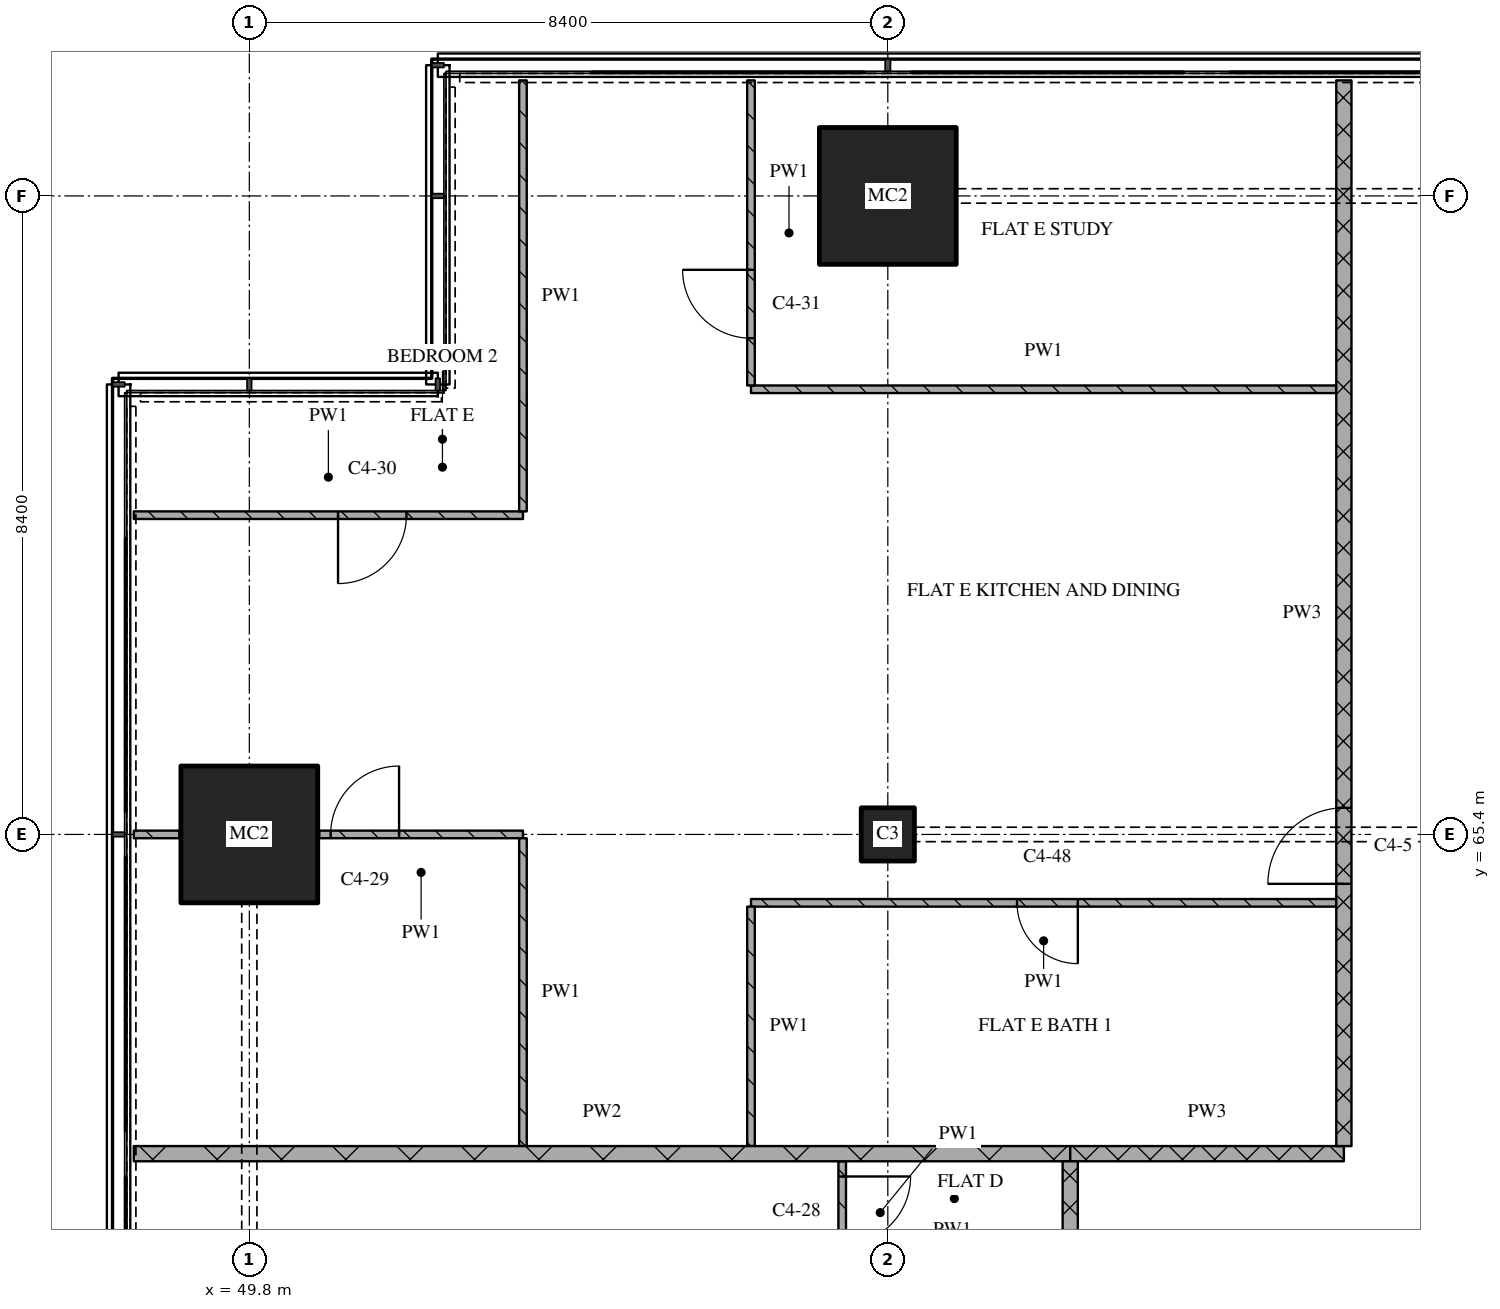
"""IFC4 building model, lengths in metres.
Left out: names, types, materials, properties, quantities, classifications, styles, units other than length and angle.
Written with IfcOpenShell. Run it as: python <this file> out.ifc"""

import sys

from ifc_helpers import new_model, si_unit, direction, frame, frame_2d, origin, origin_2d, place, context, subcontext, project, spatial, rectangle, extrude, element, fill, save


model = new_model("IFC4")
c1 = context("Model", 3, precision=1e-05, world=origin(), true_north=direction((0.0, 1.0)))
c2 = subcontext(c1, "Body", "Model", "MODEL_VIEW")
j1 = project(units=[si_unit("LENGTHUNIT", "METRE"), si_unit("PLANEANGLEUNIT", "RADIAN")], contexts=[c1])
p1 = place(None, origin())
s1 = spatial("IfcSite", under=j1, at=p1, CompositionType="ELEMENT")
p2 = place(p1, origin())
s2 = spatial("IfcBuilding", under=s1, at=p2, CompositionType="ELEMENT")
p3 = place(p2, frame((0.0, 0.0, 183.45)))
s3 = spatial("IfcBuildingStorey", under=s2, at=p3, CompositionType="ELEMENT", Elevation=183.45)
p4 = place(p3, frame((49.8, 65.4, 0.0), z_axis=(0.0, 0.0, 1.0), x_axis=(1.0, 0.0, 0.0)))
e1 = element("IfcColumn", 1, at=p4, inside=s3, PredefinedType="COLUMN", context=c2, shape_type="SweptSolid", body=[
    extrude(rectangle(XDim=1.8, YDim=1.8, at=origin_2d()), origin(), (0.0, 0.0, 1.0), 3.6),
])
p5 = place(p3, frame((58.2, 65.4, 0.0), z_axis=(0.0, 0.0, 1.0), x_axis=(1.0, 0.0, 0.0)))
e2 = element("IfcColumn", 2, at=p5, inside=s3, PredefinedType="COLUMN", context=c2, shape_type="SweptSolid", body=[
    extrude(rectangle(XDim=0.7, YDim=0.7, at=origin_2d()), origin(), (0.0, 0.0, 1.0), 3.6),
])
p6 = place(p3, frame((58.2, 73.8, 0.0), z_axis=(0.0, 0.0, 1.0), x_axis=(1.0, 0.0, 0.0)))
e3 = element("IfcColumn", 3, at=p6, inside=s3, PredefinedType="COLUMN", context=c2, shape_type="SweptSolid", body=[
    extrude(rectangle(XDim=1.8, YDim=1.8, at=origin_2d()), origin(), (0.0, 0.0, 1.0), 3.6),
])
p7 = place(p3, frame((60.6, 61.2, 0.0), z_axis=(0.0, 0.0, 1.0), x_axis=(1.0, 0.0, 0.0)))
e4 = element("IfcWall", 4, at=p7, inside=s3, PredefinedType="PARTITIONING", context=c2, shape_type="SweptSolid", body=[
    extrude(rectangle(XDim=3.6, YDim=0.2, at=frame_2d((1.8, 0.0))), origin(), (0.0, 0.0, 1.0), 3.32),
])
p8 = place(p3, frame((48.28, 61.2, 0.0), z_axis=(0.0, 0.0, 1.0), x_axis=(1.0, 0.0, 0.0)))
e5 = element("IfcWall", 5, at=p8, inside=s3, PredefinedType="PARTITIONING", context=c2, shape_type="SweptSolid", body=[
    extrude(rectangle(XDim=12.32, YDim=0.2, at=frame_2d((6.16, 0.0))), origin(), (0.0, 0.0, 1.0), 3.32),
])
p9 = place(p3, frame((64.1, 64.5, 0.0), z_axis=(0.0, 0.0, 1.0), x_axis=(-1.0, 0.0, 0.0)))
e6 = element("IfcWall", 6, at=p9, inside=s3, PredefinedType="PARTITIONING", context=c2, shape_type="SweptSolid", body=[
    extrude(rectangle(XDim=7.7, YDim=0.1, at=frame_2d((3.85, 0.0))), origin(), (0.0, 0.0, 1.0), 3.32),
])
p10 = place(p9, frame((3.4, 0.0, 0.0)))
e7 = element("IfcOpeningElement", 7, at=p10, cuts=e6, PredefinedType="OPENING", context=c2, shape_type="SweptSolid", body=[
    extrude(rectangle(XDim=0.8, YDim=2.1, at=frame_2d((0.4, 1.05))), frame((0.0, 0.06, 0.0), z_axis=(0.0, -1.0, 0.0), x_axis=(1.0, 0.0, 0.0)), (0.0, 0.0, 1.0), 0.12),
])
p11 = place(p3, frame((48.28, 65.4, 0.0), z_axis=(0.0, 0.0, 1.0), x_axis=(1.0, 0.0, 0.0)))
e8 = element("IfcWall", 8, at=p11, inside=s3, PredefinedType="PARTITIONING", context=c2, shape_type="SweptSolid", body=[
    extrude(rectangle(XDim=0.6, YDim=0.1, at=frame_2d((0.3, 0.0))), origin(), (0.0, 0.0, 1.0), 3.32),
])
p12 = place(p3, frame((53.4, 65.4, 0.0), z_axis=(0.0, 0.0, 1.0), x_axis=(-1.0, 0.0, 0.0)))
e9 = element("IfcWall", 9, at=p12, inside=s3, PredefinedType="PARTITIONING", context=c2, shape_type="SweptSolid", body=[
    extrude(rectangle(XDim=2.68, YDim=0.1, at=frame_2d((1.34, 0.0))), origin(), (0.0, 0.0, 1.0), 3.32),
])
p13 = place(p12, frame((1.63, 0.0, 0.0)))
e10 = element("IfcOpeningElement", 10, at=p13, cuts=e9, PredefinedType="OPENING", context=c2, shape_type="SweptSolid", body=[
    extrude(rectangle(XDim=0.9, YDim=2.1, at=frame_2d((0.45, 1.05))), frame((0.0, 0.06, 0.0), z_axis=(0.0, -1.0, 0.0), x_axis=(1.0, 0.0, 0.0)), (0.0, 0.0, 1.0), 0.12),
])
p14 = place(p3, frame((48.28, 69.6, 0.0), z_axis=(0.0, 0.0, 1.0), x_axis=(1.0, 0.0, 0.0)))
e11 = element("IfcWall", 11, at=p14, inside=s3, PredefinedType="PARTITIONING", context=c2, shape_type="SweptSolid", body=[
    extrude(rectangle(XDim=5.12, YDim=0.1, at=frame_2d((2.56, 0.0))), origin(), (0.0, 0.0, 1.0), 3.32),
])
p15 = place(p14, frame((2.687, 0.0, 0.0)))
e12 = element("IfcOpeningElement", 12, at=p15, cuts=e11, PredefinedType="OPENING", context=c2, shape_type="SweptSolid", body=[
    extrude(rectangle(XDim=0.9, YDim=2.1, at=frame_2d((0.45, 1.05))), frame((0.0, 0.06, 0.0), z_axis=(0.0, -1.0, 0.0), x_axis=(1.0, 0.0, 0.0)), (0.0, 0.0, 1.0), 0.12),
])
p16 = place(p3, frame((56.4, 71.256, 0.0), z_axis=(0.0, 0.0, 1.0), x_axis=(1.0, 0.0, 0.0)))
e13 = element("IfcWall", 13, at=p16, inside=s3, PredefinedType="PARTITIONING", context=c2, shape_type="SweptSolid", body=[
    extrude(rectangle(XDim=7.7, YDim=0.1, at=frame_2d((3.85, 0.0))), origin(), (0.0, 0.0, 1.0), 3.32),
])
p17 = place(p3, frame((53.4, 65.35, 0.0), z_axis=(0.0, 0.0, 1.0), x_axis=(0.0, -1.0, 0.0)))
e14 = element("IfcWall", 14, at=p17, inside=s3, PredefinedType="PARTITIONING", context=c2, shape_type="SweptSolid", body=[
    extrude(rectangle(XDim=4.05, YDim=0.1, at=frame_2d((2.025, 0.0))), origin(), (0.0, 0.0, 1.0), 3.32),
])
p18 = place(p3, frame((53.4, 75.32, 0.0), z_axis=(0.0, 0.0, 1.0), x_axis=(0.0, -1.0, 0.0)))
e15 = element("IfcWall", 15, at=p18, inside=s3, PredefinedType="PARTITIONING", context=c2, shape_type="SweptSolid", body=[
    extrude(rectangle(XDim=5.67, YDim=0.1, at=frame_2d((2.835, 0.0))), origin(), (0.0, 0.0, 1.0), 3.32),
])
p19 = place(p3, frame((56.4, 64.45, 0.0), z_axis=(0.0, 0.0, 1.0), x_axis=(0.0, -1.0, 0.0)))
e16 = element("IfcWall", 16, at=p19, inside=s3, PredefinedType="PARTITIONING", context=c2, shape_type="SweptSolid", body=[
    extrude(rectangle(XDim=3.15, YDim=0.1, at=frame_2d((1.575, 0.0))), origin(), (0.0, 0.0, 1.0), 3.32),
])
p20 = place(p3, frame((56.4, 75.32, 0.0), z_axis=(0.0, 0.0, 1.0), x_axis=(0.0, -1.0, 0.0)))
e17 = element("IfcWall", 17, at=p20, inside=s3, PredefinedType="PARTITIONING", context=c2, shape_type="SweptSolid", body=[
    extrude(rectangle(XDim=4.014, YDim=0.1, at=frame_2d((2.007, 0.0))), origin(), (0.0, 0.0, 1.0), 3.32),
])
p21 = place(p20, frame((2.492, 0.0, 0.0)))
e18 = element("IfcOpeningElement", 18, at=p21, cuts=e17, PredefinedType="OPENING", context=c2, shape_type="SweptSolid", body=[
    extrude(rectangle(XDim=0.9, YDim=2.1, at=frame_2d((0.45, 1.05))), frame((0.0, 0.06, 0.0), z_axis=(0.0, -1.0, 0.0), x_axis=(1.0, 0.0, 0.0)), (0.0, 0.0, 1.0), 0.12),
])
p22 = place(p3, frame((57.6, 61.1, 0.0), z_axis=(0.0, 0.0, 1.0), x_axis=(0.0, -1.0, 0.0)))
e19 = element("IfcWall", 19, at=p22, inside=s3, PredefinedType="PARTITIONING", context=c2, shape_type="SweptSolid", body=[
    extrude(rectangle(XDim=1.35, YDim=0.1, at=frame_2d((0.675, 0.0))), origin(), (0.0, 0.0, 1.0), 3.32),
])
p23 = place(p22, frame((0.2, 0.0, 0.0)))
e20 = element("IfcOpeningElement", 20, at=p23, cuts=e19, PredefinedType="OPENING", context=c2, shape_type="SweptSolid", body=[
    extrude(rectangle(XDim=0.9, YDim=2.1, at=frame_2d((0.45, 1.05))), frame((0.0, 0.06, 0.0), z_axis=(0.0, -1.0, 0.0), x_axis=(1.0, 0.0, 0.0)), (0.0, 0.0, 1.0), 0.12),
])
p24 = place(p3, frame((60.6, 43.3, 0.0), z_axis=(0.0, 0.0, 1.0), x_axis=(0.0, 1.0, 0.0)))
e21 = element("IfcWall", 21, at=p24, inside=s3, PredefinedType="PARTITIONING", context=c2, shape_type="SweptSolid", body=[
    extrude(rectangle(XDim=17.8, YDim=0.2, at=frame_2d((8.9, 0.0))), origin(), (0.0, 0.0, 1.0), 3.32),
])
p25 = place(p24, frame((7.65, 0.0, 0.0)))
e22 = element("IfcOpeningElement", 22, at=p25, cuts=e21, PredefinedType="OPENING", context=c2, shape_type="SweptSolid", body=[
    extrude(rectangle(XDim=1.0, YDim=2.1, at=frame_2d((0.5, 1.05))), frame((0.0, 0.11, 0.0), z_axis=(0.0, -1.0, 0.0), x_axis=(1.0, 0.0, 0.0)), (0.0, 0.0, 1.0), 0.22),
])
p26 = place(p3, frame((64.2, 61.3, 0.0), z_axis=(0.0, 0.0, 1.0), x_axis=(0.0, 1.0, 0.0)))
e23 = element("IfcWall", 23, at=p26, inside=s3, PredefinedType="PARTITIONING", context=c2, shape_type="SweptSolid", body=[
    extrude(rectangle(XDim=14.02, YDim=0.2, at=frame_2d((7.01, 0.0))), origin(), (0.0, 0.0, 1.0), 3.32),
])
p27 = place(p26, frame((3.45, 0.0, 0.0)))
e24 = element("IfcOpeningElement", 24, at=p27, cuts=e23, PredefinedType="OPENING", context=c2, shape_type="SweptSolid", body=[
    extrude(rectangle(XDim=1.0, YDim=2.1, at=frame_2d((0.5, 1.05))), frame((0.0, 0.11, 0.0), z_axis=(0.0, -1.0, 0.0), x_axis=(1.0, 0.0, 0.0)), (0.0, 0.0, 1.0), 0.22),
])
p28 = place(p10, origin())
e25 = element("IfcDoor", 25, at=p28, inside=s3, OperationType="SINGLE_SWING_LEFT", PredefinedType="DOOR", context=c2, shape_type="SweptSolid", body=[
    extrude(rectangle(XDim=0.8, YDim=2.1, at=frame_2d((0.4, 1.05))), frame((0.0, 0.025, 0.0), z_axis=(0.0, -1.0, 0.0), x_axis=(1.0, 0.0, 0.0)), (0.0, 0.0, 1.0), 0.05),
])
fill(e7, e25)
p29 = place(p13, origin())
e26 = element("IfcDoor", 26, at=p29, inside=s3, OperationType="SINGLE_SWING_RIGHT", PredefinedType="DOOR", context=c2, shape_type="SweptSolid", body=[
    extrude(rectangle(XDim=0.9, YDim=2.1, at=frame_2d((0.45, 1.05))), frame((0.0, 0.025, 0.0), z_axis=(0.0, -1.0, 0.0), x_axis=(1.0, 0.0, 0.0)), (0.0, 0.0, 1.0), 0.05),
])
fill(e10, e26)
p30 = place(p15, origin())
e27 = element("IfcDoor", 27, at=p30, inside=s3, OperationType="SINGLE_SWING_RIGHT", PredefinedType="DOOR", context=c2, shape_type="SweptSolid", body=[
    extrude(rectangle(XDim=0.9, YDim=2.1, at=frame_2d((0.45, 1.05))), frame((0.0, 0.025, 0.0), z_axis=(0.0, -1.0, 0.0), x_axis=(1.0, 0.0, 0.0)), (0.0, 0.0, 1.0), 0.05),
])
fill(e12, e27)
p31 = place(p21, origin())
e28 = element("IfcDoor", 28, at=p31, inside=s3, OperationType="SINGLE_SWING_RIGHT", PredefinedType="DOOR", context=c2, shape_type="SweptSolid", body=[
    extrude(rectangle(XDim=0.9, YDim=2.1, at=frame_2d((0.45, 1.05))), frame((0.0, 0.025, 0.0), z_axis=(0.0, -1.0, 0.0), x_axis=(1.0, 0.0, 0.0)), (0.0, 0.0, 1.0), 0.05),
])
fill(e18, e28)
p32 = place(p23, origin())
e29 = element("IfcDoor", 29, at=p32, inside=s3, OperationType="SINGLE_SWING_LEFT", PredefinedType="DOOR", context=c2, shape_type="SweptSolid", body=[
    extrude(rectangle(XDim=0.9, YDim=2.1, at=frame_2d((0.45, 1.05))), frame((0.0, 0.025, 0.0), z_axis=(0.0, -1.0, 0.0), x_axis=(1.0, 0.0, 0.0)), (0.0, 0.0, 1.0), 0.05),
])
fill(e20, e29)
p33 = place(p27, origin())
e30 = element("IfcDoor", 30, at=p33, inside=s3, OperationType="SINGLE_SWING_LEFT", PredefinedType="DOOR", context=c2, shape_type="SweptSolid", body=[
    extrude(rectangle(XDim=1.0, YDim=2.1, at=frame_2d((0.5, 1.05))), frame((0.0, 0.025, 0.0), z_axis=(0.0, -1.0, 0.0), x_axis=(1.0, 0.0, 0.0)), (0.0, 0.0, 1.0), 0.05),
])
fill(e24, e30)
save(model, sys.argv[1])
